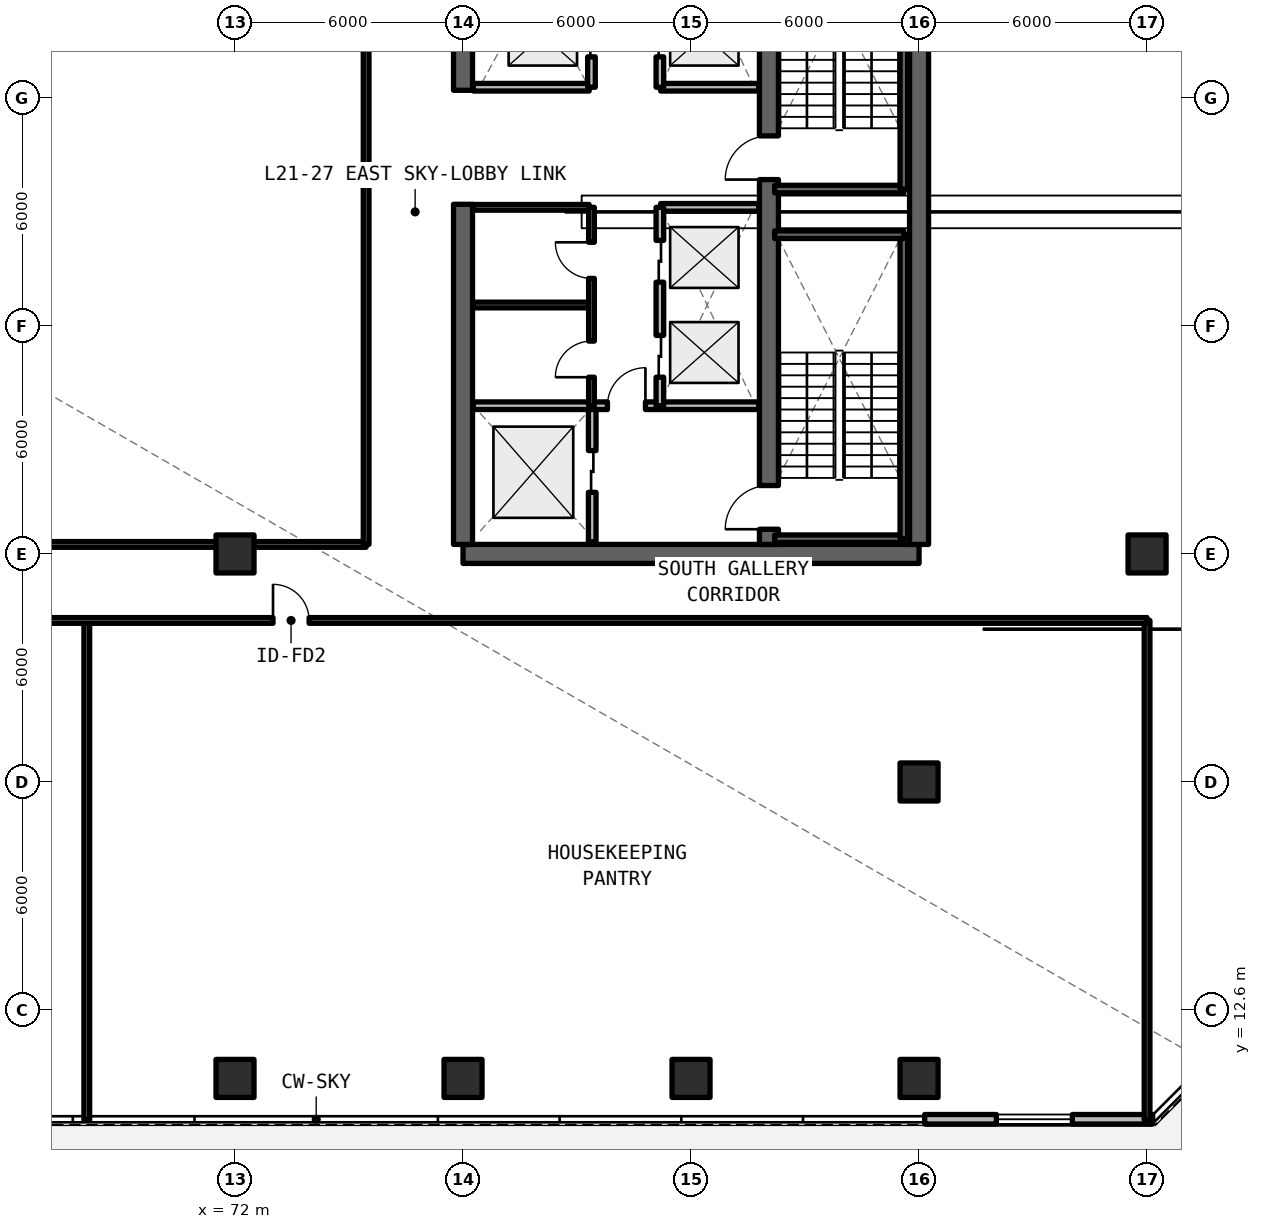
"""IFC4 building model, lengths in metres.
Left out: names, types, materials, properties, quantities, classifications, styles, units other than length and angle.
Written with IfcOpenShell. Run it as: python <this file> out.ifc"""

import sys

from ifc_helpers import new_model, si_unit, direction, frame, frame_2d, origin, origin_2d, place, context, subcontext, project, spatial, rectangle, extrude, element, fill, save


model = new_model("IFC4")
c1 = context("Model", 3, precision=1e-05, world=origin(), true_north=direction((0.0, 1.0)))
c2 = subcontext(c1, "Body", "Model", "MODEL_VIEW")
j1 = project(units=[si_unit("LENGTHUNIT", "METRE"), si_unit("PLANEANGLEUNIT", "RADIAN")], contexts=[c1])
p1 = place(None, origin())
s1 = spatial("IfcSite", under=j1, at=p1, CompositionType="ELEMENT")
p2 = place(p1, origin())
s2 = spatial("IfcBuilding", under=s1, at=p2, CompositionType="ELEMENT")
p3 = place(p2, frame((0.0, 0.0, 78.21)))
s3 = spatial("IfcBuildingStorey", under=s2, at=p3, CompositionType="ELEMENT", Elevation=78.21)
p4 = place(p3, frame((78.0, 24.6, 0.0), z_axis=(0.0, 0.0, 1.0), x_axis=(1.0, 0.0, 0.0)))
e1 = element("IfcWall", 1, at=p4, inside=s3, PredefinedType="SHEAR", context=c2, shape_type="SweptSolid", body=[
    extrude(rectangle(XDim=12.0, YDim=0.5, at=frame_2d((6.0, 0.0))), origin(), (0.0, 0.0, 1.0), 3.96),
])
p5 = place(p3, frame((90.0, 24.85, 0.0), z_axis=(0.0, 0.0, 1.0), x_axis=(0.0, 1.0, 0.0)))
e2 = element("IfcWall", 2, at=p5, inside=s3, PredefinedType="SHEAR", context=c2, shape_type="SweptSolid", body=[
    extrude(rectangle(XDim=17.5, YDim=0.5, at=frame_2d((8.75, 0.0))), origin(), (0.0, 0.0, 1.0), 3.96),
])
p6 = place(p3, frame((78.0, 24.85, 0.0), z_axis=(0.0, 0.0, 1.0), x_axis=(0.0, 1.0, 0.0)))
e3 = element("IfcWall", 3, at=p6, inside=s3, PredefinedType="SHEAR", context=c2, shape_type="SweptSolid", body=[
    extrude(rectangle(XDim=8.95, YDim=0.5, at=frame_2d((4.475, 0.0))), origin(), (0.0, 0.0, 1.0), 3.96),
])
p7 = place(p3, frame((78.0, 36.8, 0.0), z_axis=(0.0, 0.0, 1.0), x_axis=(0.0, 1.0, 0.0)))
e4 = element("IfcWall", 4, at=p7, inside=s3, PredefinedType="SHEAR", context=c2, shape_type="SweptSolid", body=[
    extrude(rectangle(XDim=5.55, YDim=0.5, at=frame_2d((2.775, 0.0))), origin(), (0.0, 0.0, 1.0), 3.96),
])
p8 = place(p3, frame((86.05, 24.85, 0.0), z_axis=(0.0, 0.0, 1.0), x_axis=(0.0, 1.0, 0.0)))
e5 = element("IfcWall", 5, at=p8, inside=s3, PredefinedType="SHEAR", context=c2, shape_type="SweptSolid", body=[
    extrude(rectangle(XDim=17.5, YDim=0.5, at=frame_2d((8.75, 0.0))), origin(), (0.0, 0.0, 1.0), 3.96),
])
p9 = place(p8, frame((0.4, 0.0, 0.0)))
e6 = element("IfcOpeningElement", 6, at=p9, cuts=e5, PredefinedType="OPENING", context=c2, shape_type="SweptSolid", body=[
    extrude(rectangle(XDim=1.15, YDim=2.15, at=frame_2d((0.575, 1.075))), frame((0.0, 0.26, 0.0), z_axis=(0.0, -1.0, 0.0), x_axis=(1.0, 0.0, 0.0)), (0.0, 0.0, 1.0), 0.52),
])
p10 = place(p8, frame((9.6, 0.0, 0.0)))
e7 = element("IfcOpeningElement", 7, at=p10, cuts=e5, PredefinedType="OPENING", context=c2, shape_type="SweptSolid", body=[
    extrude(rectangle(XDim=1.15, YDim=2.15, at=frame_2d((0.575, 1.075))), frame((0.0, 0.26, 0.0), z_axis=(0.0, -1.0, 0.0), x_axis=(1.0, 0.0, 0.0)), (0.0, 0.0, 1.0), 0.52),
])
for number, where, z_axis, x_axis in (
    (8, (72.0, 24.6, 0.0), (0.0, 0.0, 1.0), (1.0, 0.0, 0.0)),
    (9, (96.0, 24.6, 0.0), (0.0, 0.0, 1.0), (1.0, 0.0, 0.0)),
    (10, (90.0, 18.6, 0.0), (0.0, 0.0, 1.0), (1.0, 0.0, 0.0)),
):
    element("IfcColumn", number, at=place(p3, frame(where, z_axis=z_axis, x_axis=x_axis)), inside=s3, PredefinedType="COLUMN", context=c2, shape_type="SweptSolid", body=[
        extrude(rectangle(XDim=1.0, YDim=1.0, at=origin_2d()), origin(), (0.0, 0.0, 1.0), 3.96),
    ])
for number, where, z_axis, x_axis in (
    (11, (72.0, 10.8, -0.28), (0.0, 0.0, 1.0), (1.0, 0.0, 0.0)),
    (12, (78.0, 10.8, -0.28), (0.0, 0.0, 1.0), (1.0, 0.0, 0.0)),
    (13, (84.0, 10.8, -0.28), (0.0, 0.0, 1.0), (1.0, 0.0, 0.0)),
    (14, (90.0, 10.8, -0.28), (0.0, 0.0, 1.0), (1.0, 0.0, 0.0)),
):
    element("IfcColumn", number, at=place(p3, frame(where, z_axis=z_axis, x_axis=x_axis)), inside=s3, PredefinedType="COLUMN", context=c2, shape_type="SweptSolid", body=[
        extrude(rectangle(XDim=1.0, YDim=1.0, at=origin_2d()), origin(), (0.0, 0.0, 1.0), 4.24),
    ])
p11 = place(p3, frame((90.148, 9.725, 0.0), z_axis=(0.0, 0.0, 1.0), x_axis=(1.0, 0.0, 0.0)))
e15 = element("IfcWall", 15, at=p11, inside=s3, PredefinedType="SOLIDWALL", context=c2, shape_type="SweptSolid", body=[
    extrude(rectangle(XDim=6.0, YDim=0.25, at=frame_2d((3.0, 0.0))), origin(), (0.0, 0.0, 1.0), 3.74),
])
p12 = place(p11, frame((1.886, 0.0, 0.78)))
e16 = element("IfcOpeningElement", 16, at=p12, cuts=e15, PredefinedType="OPENING", context=c2, shape_type="SweptSolid", body=[
    extrude(rectangle(XDim=2.0, YDim=1.66, at=frame_2d((1.0, 0.83))), frame((0.0, 0.135, 0.0), z_axis=(0.0, -1.0, 0.0), x_axis=(1.0, 0.0, 0.0)), (0.0, 0.0, 1.0), 0.27),
])
p13 = place(p3, frame((81.4, 24.92, 0.0), z_axis=(0.0, 0.0, 1.0), x_axis=(0.0, 1.0, 0.0)))
e17 = element("IfcWall", 17, at=p13, inside=s3, PredefinedType="SOLIDWALL", context=c2, shape_type="SweptSolid", body=[
    extrude(rectangle(XDim=3.58, YDim=0.2, at=frame_2d((1.79, 0.0))), origin(), (0.0, 0.0, 1.0), 2.96),
])
p14 = place(p13, frame((1.3, 0.0, 0.0)))
e18 = element("IfcOpeningElement", 18, at=p14, cuts=e17, PredefinedType="OPENING", context=c2, shape_type="SweptSolid", body=[
    extrude(rectangle(XDim=1.1, YDim=2.2, at=frame_2d((0.55, 1.1))), frame((0.0, 0.11, 0.0), z_axis=(0.0, -1.0, 0.0), x_axis=(1.0, 0.0, 0.0)), (0.0, 0.0, 1.0), 0.22),
])
p15 = place(p3, frame((78.27, 28.5, 0.0), z_axis=(0.0, 0.0, 1.0), x_axis=(1.0, 0.0, 0.0)))
e19 = element("IfcWall", 19, at=p15, inside=s3, PredefinedType="SOLIDWALL", context=c2, shape_type="SweptSolid", body=[
    extrude(rectangle(XDim=7.51, YDim=0.2, at=frame_2d((3.755, 0.0))), origin(), (0.0, 0.0, 1.0), 2.96),
])
p16 = place(p15, frame((3.53, 0.0, 0.0)))
e20 = element("IfcOpeningElement", 20, at=p16, cuts=e19, PredefinedType="OPENING", context=c2, shape_type="SweptSolid", body=[
    extrude(rectangle(XDim=1.0, YDim=2.15, at=frame_2d((0.5, 1.075))), frame((0.0, 0.11, 0.0), z_axis=(0.0, -1.0, 0.0), x_axis=(1.0, 0.0, 0.0)), (0.0, 0.0, 1.0), 0.22),
])
p17 = place(p3, frame((83.2, 33.72, 0.0), z_axis=(0.0, 0.0, 1.0), x_axis=(1.0, 0.0, 0.0)))
e21 = element("IfcWall", 21, at=p17, inside=s3, PredefinedType="SOLIDWALL", context=c2, shape_type="SweptSolid", body=[
    extrude(rectangle(XDim=2.58, YDim=0.2, at=frame_2d((1.29, 0.0))), origin(), (0.0, 0.0, 1.0), 2.96),
])
p18 = place(p3, frame((83.18, 28.5, 0.0), z_axis=(0.0, 0.0, 1.0), x_axis=(0.0, 1.0, 0.0)))
e22 = element("IfcWall", 22, at=p18, inside=s3, PredefinedType="SOLIDWALL", context=c2, shape_type="SweptSolid", body=[
    extrude(rectangle(XDim=5.22, YDim=0.2, at=frame_2d((2.61, 0.0))), origin(), (0.0, 0.0, 1.0), 2.96),
])
p19 = place(p18, frame((0.75, 0.0, 0.0)))
e23 = element("IfcOpeningElement", 23, at=p19, cuts=e22, PredefinedType="OPENING", context=c2, shape_type="SweptSolid", body=[
    extrude(rectangle(XDim=1.1, YDim=2.2, at=frame_2d((0.55, 1.1))), frame((0.0, 0.11, 0.0), z_axis=(0.0, -1.0, 0.0), x_axis=(1.0, 0.0, 0.0)), (0.0, 0.0, 1.0), 0.22),
])
p20 = place(p18, frame((3.25, 0.0, 0.0)))
e24 = element("IfcOpeningElement", 24, at=p20, cuts=e22, PredefinedType="OPENING", context=c2, shape_type="SweptSolid", body=[
    extrude(rectangle(XDim=1.1, YDim=2.2, at=frame_2d((0.55, 1.1))), frame((0.0, 0.11, 0.0), z_axis=(0.0, -1.0, 0.0), x_axis=(1.0, 0.0, 0.0)), (0.0, 0.0, 1.0), 0.22),
])
for number, where, z_axis, x_axis in (
    (25, (78.27, 31.15, 0.0), (0.0, 0.0, 1.0), (1.0, 0.0, 0.0)),
    (26, (78.27, 33.72, 0.0), (0.0, 0.0, 1.0), (1.0, 0.0, 0.0)),
):
    element("IfcWall", number, at=place(p3, frame(where, z_axis=z_axis, x_axis=x_axis)), inside=s3, PredefinedType="SOLIDWALL", context=c2, shape_type="SweptSolid", body=[
        extrude(rectangle(XDim=3.05, YDim=0.15, at=frame_2d((1.525, 0.0))), origin(), (0.0, 0.0, 1.0), 2.96),
    ])
p21 = place(p3, frame((81.38, 28.5, 0.0), z_axis=(0.0, 0.0, 1.0), x_axis=(0.0, 1.0, 0.0)))
e27 = element("IfcWall", 27, at=p21, inside=s3, PredefinedType="SOLIDWALL", context=c2, shape_type="SweptSolid", body=[
    extrude(rectangle(XDim=5.22, YDim=0.15, at=frame_2d((2.61, 0.0))), origin(), (0.0, 0.0, 1.0), 2.96),
])
p22 = place(p21, frame((0.75, 0.0, 0.0)))
e28 = element("IfcOpeningElement", 28, at=p22, cuts=e27, PredefinedType="OPENING", context=c2, shape_type="SweptSolid", body=[
    extrude(rectangle(XDim=0.95, YDim=2.15, at=frame_2d((0.475, 1.075))), frame((0.0, 0.085, 0.0), z_axis=(0.0, -1.0, 0.0), x_axis=(1.0, 0.0, 0.0)), (0.0, 0.0, 1.0), 0.17),
])
p23 = place(p21, frame((3.35, 0.0, 0.0)))
e29 = element("IfcOpeningElement", 29, at=p23, cuts=e27, PredefinedType="OPENING", context=c2, shape_type="SweptSolid", body=[
    extrude(rectangle(XDim=0.95, YDim=2.15, at=frame_2d((0.475, 1.075))), frame((0.0, 0.085, 0.0), z_axis=(0.0, -1.0, 0.0), x_axis=(1.0, 0.0, 0.0)), (0.0, 0.0, 1.0), 0.17),
])
p24 = place(p3, frame((83.2, 36.88, 0.0), z_axis=(0.0, 0.0, 1.0), x_axis=(1.0, 0.0, 0.0)))
e30 = element("IfcWall", 30, at=p24, inside=s3, PredefinedType="SOLIDWALL", context=c2, shape_type="SweptSolid", body=[
    extrude(rectangle(XDim=2.58, YDim=0.2, at=frame_2d((1.29, 0.0))), origin(), (0.0, 0.0, 1.0), 2.96),
])
p25 = place(p3, frame((83.18, 36.88, 0.0), z_axis=(0.0, 0.0, 1.0), x_axis=(0.0, 1.0, 0.0)))
e31 = element("IfcWall", 31, at=p25, inside=s3, PredefinedType="SOLIDWALL", context=c2, shape_type="SweptSolid", body=[
    extrude(rectangle(XDim=5.42, YDim=0.2, at=frame_2d((2.71, 0.0))), origin(), (0.0, 0.0, 1.0), 2.96),
])
p26 = place(p25, frame((0.8, 0.0, 0.0)))
e32 = element("IfcOpeningElement", 32, at=p26, cuts=e31, PredefinedType="OPENING", context=c2, shape_type="SweptSolid", body=[
    extrude(rectangle(XDim=1.1, YDim=2.2, at=frame_2d((0.55, 1.1))), frame((0.0, 0.11, 0.0), z_axis=(0.0, -1.0, 0.0), x_axis=(1.0, 0.0, 0.0)), (0.0, 0.0, 1.0), 0.22),
])
p27 = place(p25, frame((3.3, 0.0, 0.0)))
e33 = element("IfcOpeningElement", 33, at=p27, cuts=e31, PredefinedType="OPENING", context=c2, shape_type="SweptSolid", body=[
    extrude(rectangle(XDim=1.1, YDim=2.2, at=frame_2d((0.55, 1.1))), frame((0.0, 0.11, 0.0), z_axis=(0.0, -1.0, 0.0), x_axis=(1.0, 0.0, 0.0)), (0.0, 0.0, 1.0), 0.22),
])
p28 = place(p3, frame((78.27, 36.88, 0.0), z_axis=(0.0, 0.0, 1.0), x_axis=(1.0, 0.0, 0.0)))
e34 = element("IfcWall", 34, at=p28, inside=s3, PredefinedType="SOLIDWALL", context=c2, shape_type="SweptSolid", body=[
    extrude(rectangle(XDim=3.05, YDim=0.2, at=frame_2d((1.525, 0.0))), origin(), (0.0, 0.0, 1.0), 2.96),
])
p29 = place(p3, frame((81.38, 36.88, 0.0), z_axis=(0.0, 0.0, 1.0), x_axis=(0.0, 1.0, 0.0)))
e35 = element("IfcWall", 35, at=p29, inside=s3, PredefinedType="SOLIDWALL", context=c2, shape_type="SweptSolid", body=[
    extrude(rectangle(XDim=5.42, YDim=0.2, at=frame_2d((2.71, 0.0))), origin(), (0.0, 0.0, 1.0), 2.96),
])
p30 = place(p29, frame((0.8, 0.0, 0.0)))
e36 = element("IfcOpeningElement", 36, at=p30, cuts=e35, PredefinedType="OPENING", context=c2, shape_type="SweptSolid", body=[
    extrude(rectangle(XDim=1.1, YDim=2.2, at=frame_2d((0.55, 1.1))), frame((0.0, 0.11, 0.0), z_axis=(0.0, -1.0, 0.0), x_axis=(1.0, 0.0, 0.0)), (0.0, 0.0, 1.0), 0.22),
])
p31 = place(p29, frame((3.3, 0.0, 0.0)))
e37 = element("IfcOpeningElement", 37, at=p31, cuts=e35, PredefinedType="OPENING", context=c2, shape_type="SweptSolid", body=[
    extrude(rectangle(XDim=1.1, YDim=2.2, at=frame_2d((0.55, 1.1))), frame((0.0, 0.11, 0.0), z_axis=(0.0, -1.0, 0.0), x_axis=(1.0, 0.0, 0.0)), (0.0, 0.0, 1.0), 0.22),
])
p32 = place(p3, frame((38.55, 24.85, 0.0), z_axis=(0.0, 0.0, 1.0), x_axis=(1.0, 0.0, 0.0)))
e38 = element("IfcWall", 38, at=p32, inside=s3, PredefinedType="SOLIDWALL", context=c2, shape_type="SweptSolid", body=[
    extrude(rectangle(XDim=36.9, YDim=0.15, at=frame_2d((18.45, 0.0))), origin(), (0.0, 0.0, 1.0), 2.96),
])
p33 = place(p3, frame((75.45, 24.85, 0.0), z_axis=(0.0, 0.0, 1.0), x_axis=(0.0, 1.0, 0.0)))
e39 = element("IfcWall", 39, at=p33, inside=s3, PredefinedType="SOLIDWALL", context=c2, shape_type="SweptSolid", body=[
    extrude(rectangle(XDim=17.5, YDim=0.15, at=frame_2d((8.75, 0.0))), origin(), (0.0, 0.0, 1.0), 2.96),
])
p34 = place(p3, frame((68.1, 9.7, 0.0), z_axis=(0.0, 0.0, 1.0), x_axis=(0.0, 1.0, 0.0)))
e40 = element("IfcWall", 40, at=p34, inside=s3, PredefinedType="PARTITIONING", context=c2, shape_type="SweptSolid", body=[
    extrude(rectangle(XDim=13.15, YDim=0.15, at=frame_2d((6.575, 0.0))), origin(), (0.0, 0.0, 1.0), 2.96),
])
p35 = place(p3, frame((96.0, 9.7, 0.0), z_axis=(0.0, 0.0, 1.0), x_axis=(0.0, 1.0, 0.0)))
e41 = element("IfcWall", 41, at=p35, inside=s3, PredefinedType="SOLIDWALL", context=c2, shape_type="SweptSolid", body=[
    extrude(rectangle(XDim=13.15, YDim=0.15, at=frame_2d((6.575, 0.0))), origin(), (0.0, 0.0, 1.0), 2.96),
])
p36 = place(p3, frame((21.6, 22.85, 0.0), z_axis=(0.0, 0.0, 1.0), x_axis=(1.0, 0.0, 0.0)))
e42 = element("IfcWall", 42, at=p36, inside=s3, PredefinedType="SOLIDWALL", context=c2, shape_type="SweptSolid", body=[
    extrude(rectangle(XDim=74.4, YDim=0.15, at=frame_2d((37.2, 0.0))), origin(), (0.0, 0.0, 1.0), 2.96),
])
p37 = place(p36, frame((6.0, 0.0, 0.0)))
e43 = element("IfcOpeningElement", 43, at=p37, cuts=e42, PredefinedType="OPENING", context=c2, shape_type="SweptSolid", body=[
    extrude(rectangle(XDim=1.4, YDim=2.15, at=frame_2d((0.7, 1.075))), frame((0.0, 0.085, 0.0), z_axis=(0.0, -1.0, 0.0), x_axis=(1.0, 0.0, 0.0)), (0.0, 0.0, 1.0), 0.17),
])
p38 = place(p36, frame((24.55, 0.0, 0.0)))
e44 = element("IfcOpeningElement", 44, at=p38, cuts=e42, PredefinedType="OPENING", context=c2, shape_type="SweptSolid", body=[
    extrude(rectangle(XDim=1.1, YDim=2.15, at=frame_2d((0.55, 1.075))), frame((0.0, 0.085, 0.0), z_axis=(0.0, -1.0, 0.0), x_axis=(1.0, 0.0, 0.0)), (0.0, 0.0, 1.0), 0.17),
])
p39 = place(p36, frame((34.9, 0.0, 0.0)))
e45 = element("IfcOpeningElement", 45, at=p39, cuts=e42, PredefinedType="OPENING", context=c2, shape_type="SweptSolid", body=[
    extrude(rectangle(XDim=1.4, YDim=2.15, at=frame_2d((0.7, 1.075))), frame((0.0, 0.085, 0.0), z_axis=(0.0, -1.0, 0.0), x_axis=(1.0, 0.0, 0.0)), (0.0, 0.0, 1.0), 0.17),
])
p40 = place(p36, frame((51.4, 0.0, 0.0)))
e46 = element("IfcOpeningElement", 46, at=p40, cuts=e42, PredefinedType="OPENING", context=c2, shape_type="SweptSolid", body=[
    extrude(rectangle(XDim=0.95, YDim=2.15, at=frame_2d((0.475, 1.075))), frame((0.0, 0.085, 0.0), z_axis=(0.0, -1.0, 0.0), x_axis=(1.0, 0.0, 0.0)), (0.0, 0.0, 1.0), 0.17),
])
p41 = place(p3, frame((86.2, 25.0, 0.0), z_axis=(0.0, 0.0, 1.0), x_axis=(1.0, 0.0, 0.0)))
e47 = element("IfcWall", 47, at=p41, inside=s3, PredefinedType="SOLIDWALL", context=c2, shape_type="SweptSolid", body=[
    extrude(rectangle(XDim=3.4, YDim=0.2, at=frame_2d((1.7, 0.0))), origin(), (0.0, 0.0, 1.0), 3.96),
])
p42 = place(p3, frame((89.6, 25.0, 0.0), z_axis=(0.0, 0.0, 1.0), x_axis=(0.0, 1.0, 0.0)))
e48 = element("IfcWall", 48, at=p42, inside=s3, PredefinedType="SOLIDWALL", context=c2, shape_type="SweptSolid", body=[
    extrude(rectangle(XDim=8.0, YDim=0.2, at=frame_2d((4.0, 0.0))), origin(), (0.0, 0.0, 1.0), 3.96),
])
for number, where, z_axis, x_axis in (
    (49, (89.6, 33.0, 0.0), (0.0, 0.0, 1.0), (-1.0, 0.0, 0.0)),
    (50, (86.2, 34.2, 0.0), (0.0, 0.0, 1.0), (1.0, 0.0, 0.0)),
):
    element("IfcWall", number, at=place(p3, frame(where, z_axis=z_axis, x_axis=x_axis)), inside=s3, PredefinedType="SOLIDWALL", context=c2, shape_type="SweptSolid", body=[
        extrude(rectangle(XDim=3.4, YDim=0.2, at=frame_2d((1.7, 0.0))), origin(), (0.0, 0.0, 1.0), 3.96),
    ])
p43 = place(p3, frame((89.6, 34.2, 0.0), z_axis=(0.0, 0.0, 1.0), x_axis=(0.0, 1.0, 0.0)))
e51 = element("IfcWall", 51, at=p43, inside=s3, PredefinedType="SOLIDWALL", context=c2, shape_type="SweptSolid", body=[
    extrude(rectangle(XDim=8.0, YDim=0.2, at=frame_2d((4.0, 0.0))), origin(), (0.0, 0.0, 1.0), 3.96),
])
p44 = place(p12, origin())
e52 = element("IfcWindow", 52, at=p44, inside=s3, PartitioningType="SINGLE_PANEL", PredefinedType="WINDOW", context=c2, shape_type="SweptSolid", body=[
    extrude(rectangle(XDim=2.0, YDim=1.66, at=frame_2d((1.0, 0.83))), frame((0.0, 0.03, 0.0), z_axis=(0.0, -1.0, 0.0), x_axis=(1.0, 0.0, 0.0)), (0.0, 0.0, 1.0), 0.06),
])
fill(e16, e52)
p45 = place(p14, origin())
e53 = element("IfcDoor", 53, at=p45, inside=s3, OperationType="SLIDING_TO_LEFT", PredefinedType="DOOR", context=c2, shape_type="SweptSolid", body=[
    extrude(rectangle(XDim=1.1, YDim=2.2, at=frame_2d((0.55, 1.1))), frame((0.0, 0.025, 0.0), z_axis=(0.0, -1.0, 0.0), x_axis=(1.0, 0.0, 0.0)), (0.0, 0.0, 1.0), 0.05),
])
fill(e18, e53)
p46 = place(p16, origin())
e54 = element("IfcDoor", 54, at=p46, inside=s3, OperationType="SINGLE_SWING_RIGHT", PredefinedType="DOOR", context=c2, shape_type="SweptSolid", body=[
    extrude(rectangle(XDim=1.0, YDim=2.15, at=frame_2d((0.5, 1.075))), frame((0.0, 0.025, 0.0), z_axis=(0.0, -1.0, 0.0), x_axis=(1.0, 0.0, 0.0)), (0.0, 0.0, 1.0), 0.05),
])
fill(e20, e54)
p47 = place(p19, origin())
e55 = element("IfcDoor", 55, at=p47, inside=s3, OperationType="SLIDING_TO_LEFT", PredefinedType="DOOR", context=c2, shape_type="SweptSolid", body=[
    extrude(rectangle(XDim=1.1, YDim=2.2, at=frame_2d((0.55, 1.1))), frame((0.0, 0.025, 0.0), z_axis=(0.0, -1.0, 0.0), x_axis=(1.0, 0.0, 0.0)), (0.0, 0.0, 1.0), 0.05),
])
fill(e23, e55)
p48 = place(p20, origin())
e56 = element("IfcDoor", 56, at=p48, inside=s3, OperationType="SLIDING_TO_RIGHT", PredefinedType="DOOR", context=c2, shape_type="SweptSolid", body=[
    extrude(rectangle(XDim=1.1, YDim=2.2, at=frame_2d((0.55, 1.1))), frame((0.0, 0.025, 0.0), z_axis=(0.0, -1.0, 0.0), x_axis=(1.0, 0.0, 0.0)), (0.0, 0.0, 1.0), 0.05),
])
fill(e24, e56)
p49 = place(p22, origin())
e57 = element("IfcDoor", 57, at=p49, inside=s3, OperationType="SINGLE_SWING_LEFT", PredefinedType="DOOR", context=c2, shape_type="SweptSolid", body=[
    extrude(rectangle(XDim=0.95, YDim=2.15, at=frame_2d((0.475, 1.075))), frame((0.0, 0.025, 0.0), z_axis=(0.0, -1.0, 0.0), x_axis=(1.0, 0.0, 0.0)), (0.0, 0.0, 1.0), 0.05),
])
fill(e28, e57)
p50 = place(p23, origin())
e58 = element("IfcDoor", 58, at=p50, inside=s3, OperationType="SINGLE_SWING_RIGHT", PredefinedType="DOOR", context=c2, shape_type="SweptSolid", body=[
    extrude(rectangle(XDim=0.95, YDim=2.15, at=frame_2d((0.475, 1.075))), frame((0.0, 0.025, 0.0), z_axis=(0.0, -1.0, 0.0), x_axis=(1.0, 0.0, 0.0)), (0.0, 0.0, 1.0), 0.05),
])
fill(e29, e58)
p51 = place(p26, origin())
e59 = element("IfcDoor", 59, at=p51, inside=s3, OperationType="SLIDING_TO_LEFT", PredefinedType="DOOR", context=c2, shape_type="SweptSolid", body=[
    extrude(rectangle(XDim=1.1, YDim=2.2, at=frame_2d((0.55, 1.1))), frame((0.0, 0.025, 0.0), z_axis=(0.0, -1.0, 0.0), x_axis=(1.0, 0.0, 0.0)), (0.0, 0.0, 1.0), 0.05),
])
fill(e32, e59)
p52 = place(p30, origin())
e60 = element("IfcDoor", 60, at=p52, inside=s3, OperationType="SLIDING_TO_LEFT", PredefinedType="DOOR", context=c2, shape_type="SweptSolid", body=[
    extrude(rectangle(XDim=1.1, YDim=2.2, at=frame_2d((0.55, 1.1))), frame((0.0, 0.025, 0.0), z_axis=(0.0, -1.0, 0.0), x_axis=(1.0, 0.0, 0.0)), (0.0, 0.0, 1.0), 0.05),
])
fill(e36, e60)
p53 = place(p40, origin())
e61 = element("IfcDoor", 61, at=p53, inside=s3, OperationType="SINGLE_SWING_LEFT", PredefinedType="DOOR", context=c2, shape_type="SweptSolid", body=[
    extrude(rectangle(XDim=0.95, YDim=2.15, at=frame_2d((0.475, 1.075))), frame((0.0, 0.025, 0.0), z_axis=(0.0, -1.0, 0.0), x_axis=(1.0, 0.0, 0.0)), (0.0, 0.0, 1.0), 0.05),
])
fill(e46, e61)
p54 = place(p9, origin())
e62 = element("IfcDoor", 62, at=p54, inside=s3, OperationType="SINGLE_SWING_LEFT", PredefinedType="DOOR", context=c2, shape_type="SweptSolid", body=[
    extrude(rectangle(XDim=1.15, YDim=2.15, at=frame_2d((0.575, 1.075))), frame((0.0, 0.025, 0.0), z_axis=(0.0, -1.0, 0.0), x_axis=(1.0, 0.0, 0.0)), (0.0, 0.0, 1.0), 0.05),
])
fill(e6, e62)
p55 = place(p10, origin())
e63 = element("IfcDoor", 63, at=p55, inside=s3, OperationType="SINGLE_SWING_RIGHT", PredefinedType="DOOR", context=c2, shape_type="SweptSolid", body=[
    extrude(rectangle(XDim=1.15, YDim=2.15, at=frame_2d((0.575, 1.075))), frame((0.0, 0.025, 0.0), z_axis=(0.0, -1.0, 0.0), x_axis=(1.0, 0.0, 0.0)), (0.0, 0.0, 1.0), 0.05),
])
fill(e7, e63)
save(model, sys.argv[1])
